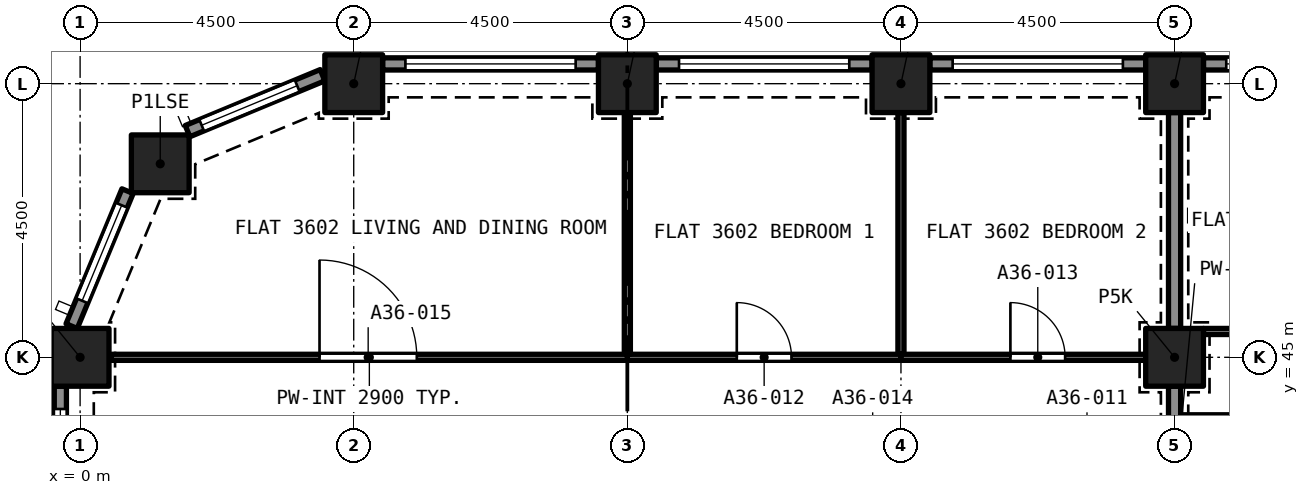
"""IFC4 building model, lengths in metres.
Left out: names, types, materials, properties, quantities, classifications, styles, units other than length and angle.
Written with IfcOpenShell. Run it as: python <this file> out.ifc"""

import sys

from ifc_helpers import new_model, si_unit, direction, frame, frame_2d, origin, origin_2d, place, context, subcontext, project, spatial, rectangle, extrude, element, fill, save


model = new_model("IFC4")
c1 = context("Model", 3, precision=1e-05, world=origin(), true_north=direction((0.0, 1.0)))
c2 = subcontext(c1, "Body", "Model", "MODEL_VIEW")
j1 = project(units=[si_unit("LENGTHUNIT", "METRE"), si_unit("PLANEANGLEUNIT", "RADIAN")], contexts=[c1])
p1 = place(None, origin())
s1 = spatial("IfcSite", under=j1, at=p1, CompositionType="ELEMENT")
p2 = place(p1, origin())
s2 = spatial("IfcBuilding", under=s1, at=p2, CompositionType="ELEMENT")
p3 = place(p2, frame((0.0, 0.0, 130.2)))
s3 = spatial("IfcBuildingStorey", under=s2, at=p3, CompositionType="ELEMENT", Elevation=130.2)
for number, where, z_axis, x_axis in (
    (1, (0.0, 45.0, 0.0), (0.0, 0.0, 1.0), (1.0, 0.0, 0.0)),
    (2, (18.0, 45.0, 0.0), (0.0, 0.0, 1.0), (1.0, 0.0, 0.0)),
    (3, (1.318, 48.182, 0.0), (0.0, 0.0, 1.0), (1.0, 0.0, 0.0)),
    (4, (4.5, 49.5, 0.0), (0.0, 0.0, 1.0), (1.0, 0.0, 0.0)),
    (5, (9.0, 49.5, 0.0), (0.0, 0.0, 1.0), (1.0, 0.0, 0.0)),
    (6, (13.5, 49.5, 0.0), (0.0, 0.0, 1.0), (1.0, 0.0, 0.0)),
    (7, (18.0, 49.5, 0.0), (0.0, 0.0, 1.0), (1.0, 0.0, 0.0)),
):
    element("IfcColumn", number, at=place(p3, frame(where, z_axis=z_axis, x_axis=x_axis)), inside=s3, PredefinedType="COLUMN", context=c2, shape_type="SweptSolid", body=[
        extrude(rectangle(XDim=0.95, YDim=0.95, at=origin_2d()), origin(), (0.0, 0.0, 1.0), 3.2),
    ])
p4 = place(p3, frame((18.475, 49.825, 0.0), z_axis=(0.0, 0.0, 1.0), x_axis=(1.0, 0.0, 0.0)))
e8 = element("IfcWall", 8, at=p4, inside=s3, PredefinedType="SOLIDWALL", context=c2, shape_type="SweptSolid", body=[
    extrude(rectangle(XDim=3.55, YDim=0.2, at=frame_2d((1.775, 0.0))), origin(), (0.0, 0.0, 1.0), 3.2),
])
p5 = place(p4, frame((0.375, 0.0, 0.45)))
e9 = element("IfcOpeningElement", 9, at=p5, cuts=e8, PredefinedType="OPENING", context=c2, shape_type="SweptSolid", body=[
    extrude(rectangle(XDim=2.8, YDim=1.95, at=frame_2d((1.4, 0.975))), frame((0.0, 0.11, 0.0), z_axis=(0.0, -1.0, 0.0), x_axis=(1.0, 0.0, 0.0)), (0.0, 0.0, 1.0), 0.22),
])
p6 = place(p3, frame((13.975, 49.825, 0.0), z_axis=(0.0, 0.0, 1.0), x_axis=(1.0, 0.0, 0.0)))
e10 = element("IfcWall", 10, at=p6, inside=s3, PredefinedType="SOLIDWALL", context=c2, shape_type="SweptSolid", body=[
    extrude(rectangle(XDim=3.55, YDim=0.2, at=frame_2d((1.775, 0.0))), origin(), (0.0, 0.0, 1.0), 3.2),
])
p7 = place(p6, frame((0.375, 0.0, 0.45)))
e11 = element("IfcOpeningElement", 11, at=p7, cuts=e10, PredefinedType="OPENING", context=c2, shape_type="SweptSolid", body=[
    extrude(rectangle(XDim=2.8, YDim=1.95, at=frame_2d((1.4, 0.975))), frame((0.0, 0.11, 0.0), z_axis=(0.0, -1.0, 0.0), x_axis=(1.0, 0.0, 0.0)), (0.0, 0.0, 1.0), 0.22),
])
p8 = place(p3, frame((9.475, 49.825, 0.0), z_axis=(0.0, 0.0, 1.0), x_axis=(1.0, 0.0, 0.0)))
e12 = element("IfcWall", 12, at=p8, inside=s3, PredefinedType="SOLIDWALL", context=c2, shape_type="SweptSolid", body=[
    extrude(rectangle(XDim=3.55, YDim=0.2, at=frame_2d((1.775, 0.0))), origin(), (0.0, 0.0, 1.0), 3.2),
])
p9 = place(p8, frame((0.375, 0.0, 0.45)))
e13 = element("IfcOpeningElement", 13, at=p9, cuts=e12, PredefinedType="OPENING", context=c2, shape_type="SweptSolid", body=[
    extrude(rectangle(XDim=2.8, YDim=1.95, at=frame_2d((1.4, 0.975))), frame((0.0, 0.11, 0.0), z_axis=(0.0, -1.0, 0.0), x_axis=(1.0, 0.0, 0.0)), (0.0, 0.0, 1.0), 0.22),
])
p10 = place(p3, frame((4.975, 49.825, 0.0), z_axis=(0.0, 0.0, 1.0), x_axis=(1.0, 0.0, 0.0)))
e14 = element("IfcWall", 14, at=p10, inside=s3, PredefinedType="SOLIDWALL", context=c2, shape_type="SweptSolid", body=[
    extrude(rectangle(XDim=3.55, YDim=0.2, at=frame_2d((1.775, 0.0))), origin(), (0.0, 0.0, 1.0), 3.2),
])
p11 = place(p10, frame((0.375, 0.0, 0.45)))
e15 = element("IfcOpeningElement", 15, at=p11, cuts=e14, PredefinedType="OPENING", context=c2, shape_type="SweptSolid", body=[
    extrude(rectangle(XDim=2.8, YDim=1.95, at=frame_2d((1.4, 0.975))), frame((0.0, 0.11, 0.0), z_axis=(0.0, -1.0, 0.0), x_axis=(1.0, 0.0, 0.0)), (0.0, 0.0, 1.0), 0.22),
])
p12 = place(p3, frame((1.767, 48.72, 0.0), z_axis=(0.0, 0.0, 1.0), x_axis=(0.923880599843, 0.382680855588, 0.0)))
e16 = element("IfcWall", 16, at=p12, inside=s3, PredefinedType="SOLIDWALL", context=c2, shape_type="SweptSolid", body=[
    extrude(rectangle(XDim=2.403, YDim=0.2, at=frame_2d((1.201, 0.0))), origin(), (0.0, 0.0, 1.0), 3.2),
])
p13 = place(p12, frame((0.251, 0.0, 0.45)))
e17 = element("IfcOpeningElement", 17, at=p13, cuts=e16, PredefinedType="OPENING", context=c2, shape_type="SweptSolid", body=[
    extrude(rectangle(XDim=1.7, YDim=1.95, at=frame_2d((0.85, 0.975))), frame((0.0, 0.11, 0.0), z_axis=(0.0, -1.0, 0.0), x_axis=(1.0, 0.0, 0.0)), (0.0, 0.0, 1.0), 0.22),
])
p14 = place(p3, frame((-0.139, 45.513, 0.0), z_axis=(0.0, 0.0, 1.0), x_axis=(0.382680855588, 0.923880599843, 0.0)))
e18 = element("IfcWall", 18, at=p14, inside=s3, PredefinedType="SOLIDWALL", context=c2, shape_type="SweptSolid", body=[
    extrude(rectangle(XDim=2.403, YDim=0.2, at=frame_2d((1.201, 0.0))), origin(), (0.0, 0.0, 1.0), 3.2),
])
p15 = place(p14, frame((0.451, 0.0, 0.45)))
e19 = element("IfcOpeningElement", 19, at=p15, cuts=e18, PredefinedType="OPENING", context=c2, shape_type="SweptSolid", body=[
    extrude(rectangle(XDim=1.7, YDim=1.95, at=frame_2d((0.85, 0.975))), frame((0.0, 0.11, 0.0), z_axis=(0.0, -1.0, 0.0), x_axis=(1.0, 0.0, 0.0)), (0.0, 0.0, 1.0), 0.22),
])
p16 = place(p3, frame((-0.325, 40.975, 0.0), z_axis=(0.0, 0.0, 1.0), x_axis=(0.0, 1.0, 0.0)))
e20 = element("IfcWall", 20, at=p16, inside=s3, PredefinedType="SOLIDWALL", context=c2, shape_type="SweptSolid", body=[
    extrude(rectangle(XDim=3.55, YDim=0.2, at=frame_2d((1.775, 0.0))), origin(), (0.0, 0.0, 1.0), 3.2),
])
p17 = place(p16, frame((0.375, 0.0, 0.45)))
e21 = element("IfcOpeningElement", 21, at=p17, cuts=e20, PredefinedType="OPENING", context=c2, shape_type="SweptSolid", body=[
    extrude(rectangle(XDim=2.8, YDim=1.95, at=frame_2d((1.4, 0.975))), frame((0.0, 0.11, 0.0), z_axis=(0.0, -1.0, 0.0), x_axis=(1.0, 0.0, 0.0)), (0.0, 0.0, 1.0), 0.22),
])
p18 = place(p3, frame((18.0, 40.975, 0.0), z_axis=(0.0, 0.0, 1.0), x_axis=(0.0, 1.0, 0.0)))
e22 = element("IfcWall", 22, at=p18, inside=s3, PredefinedType="PARTITIONING", context=c2, shape_type="SweptSolid", body=[
    extrude(rectangle(XDim=3.55, YDim=0.2, at=frame_2d((1.775, 0.0))), origin(), (0.0, 0.0, 1.0), 2.38),
])
p19 = place(p3, frame((13.5, 45.05, 0.0), z_axis=(0.0, 0.0, 1.0), x_axis=(0.0, 1.0, 0.0)))
e23 = element("IfcWall", 23, at=p19, inside=s3, PredefinedType="PARTITIONING", context=c2, shape_type="SweptSolid", body=[
    extrude(rectangle(XDim=3.975, YDim=0.1, at=frame_2d((1.987, 0.0))), origin(), (0.0, 0.0, 1.0), 2.9),
])
p20 = place(p3, frame((9.0, 45.0, 0.0), z_axis=(0.0, 0.0, 1.0), x_axis=(1.0, 0.0, 0.0)))
e24 = element("IfcWall", 24, at=p20, inside=s3, PredefinedType="PARTITIONING", context=c2, shape_type="SweptSolid", body=[
    extrude(rectangle(XDim=4.5, YDim=0.1, at=frame_2d((2.25, 0.0))), origin(), (0.0, 0.0, 1.0), 2.9),
])
p21 = place(p20, frame((1.8, 0.0, 0.0)))
e25 = element("IfcOpeningElement", 25, at=p21, cuts=e24, PredefinedType="OPENING", context=c2, shape_type="SweptSolid", body=[
    extrude(rectangle(XDim=0.9, YDim=2.1, at=frame_2d((0.45, 1.05))), frame((0.0, 0.06, 0.0), z_axis=(0.0, -1.0, 0.0), x_axis=(1.0, 0.0, 0.0)), (0.0, 0.0, 1.0), 0.12),
])
p22 = place(p3, frame((9.0, 45.05, 0.0), z_axis=(0.0, 0.0, 1.0), x_axis=(0.0, 1.0, 0.0)))
e26 = element("IfcWall", 26, at=p22, inside=s3, PredefinedType="PARTITIONING", context=c2, shape_type="SweptSolid", body=[
    extrude(rectangle(XDim=3.975, YDim=0.1, at=frame_2d((1.987, 0.0))), origin(), (0.0, 0.0, 1.0), 2.9),
])
p23 = place(p3, frame((13.5, 45.0, 0.0), z_axis=(0.0, 0.0, 1.0), x_axis=(1.0, 0.0, 0.0)))
e27 = element("IfcWall", 27, at=p23, inside=s3, PredefinedType="PARTITIONING", context=c2, shape_type="SweptSolid", body=[
    extrude(rectangle(XDim=4.025, YDim=0.1, at=frame_2d((2.012, 0.0))), origin(), (0.0, 0.0, 1.0), 2.9),
])
p24 = place(p23, frame((1.8, 0.0, 0.0)))
e28 = element("IfcOpeningElement", 28, at=p24, cuts=e27, PredefinedType="OPENING", context=c2, shape_type="SweptSolid", body=[
    extrude(rectangle(XDim=0.9, YDim=2.1, at=frame_2d((0.45, 1.05))), frame((0.0, 0.06, 0.0), z_axis=(0.0, -1.0, 0.0), x_axis=(1.0, 0.0, 0.0)), (0.0, 0.0, 1.0), 0.12),
])
p25 = place(p3, frame((18.0, 45.475, 0.0), z_axis=(0.0, 0.0, 1.0), x_axis=(0.0, 1.0, 0.0)))
e29 = element("IfcWall", 29, at=p25, inside=s3, PredefinedType="PARTITIONING", context=c2, shape_type="SweptSolid", body=[
    extrude(rectangle(XDim=3.55, YDim=0.2, at=frame_2d((1.775, 0.0))), origin(), (0.0, 0.0, 1.0), 2.38),
])
p26 = place(p3, frame((0.514, 45.0, 0.0), z_axis=(0.0, 0.0, 1.0), x_axis=(1.0, 0.0, 0.0)))
e30 = element("IfcWall", 30, at=p26, inside=s3, PredefinedType="PARTITIONING", context=c2, shape_type="SweptSolid", body=[
    extrude(rectangle(XDim=8.486, YDim=0.1, at=frame_2d((4.243, 0.0))), origin(), (0.0, 0.0, 1.0), 2.9),
])
p27 = place(p26, frame((3.423, 0.0, 0.0)))
e31 = element("IfcOpeningElement", 31, at=p27, cuts=e30, PredefinedType="OPENING", context=c2, shape_type="SweptSolid", body=[
    extrude(rectangle(XDim=1.6, YDim=2.1, at=frame_2d((0.8, 1.05))), frame((0.0, 0.06, 0.0), z_axis=(0.0, -1.0, 0.0), x_axis=(1.0, 0.0, 0.0)), (0.0, 0.0, 1.0), 0.12),
])
p28 = place(p3, frame((21.24, 44.005, 0.0), z_axis=(0.0, 0.0, 1.0), x_axis=(-1.0, 0.0, 0.0)))
e32 = element("IfcWall", 32, at=p28, inside=s3, PredefinedType="PARTITIONING", context=c2, shape_type="SweptSolid", body=[
    extrude(rectangle(XDim=3.14, YDim=0.1, at=frame_2d((1.57, 0.0))), origin(), (0.0, 0.0, 1.0), 2.75),
])
p29 = place(p28, frame((1.17, 0.0, 0.0)))
e33 = element("IfcOpeningElement", 33, at=p29, cuts=e32, PredefinedType="OPENING", context=c2, shape_type="SweptSolid", body=[
    extrude(rectangle(XDim=0.9, YDim=2.1, at=frame_2d((0.45, 1.05))), frame((0.0, 0.06, 0.0), z_axis=(0.0, -1.0, 0.0), x_axis=(1.0, 0.0, 0.0)), (0.0, 0.0, 1.0), 0.12),
])
p30 = place(p3, frame((18.475, 45.425, 0.0), z_axis=(0.0, 0.0, 1.0), x_axis=(1.0, 0.0, 0.0)))
e34 = element("IfcWall", 34, at=p30, inside=s3, PredefinedType="PARTITIONING", context=c2, shape_type="SweptSolid", body=[
    extrude(rectangle(XDim=4.025, YDim=0.1, at=frame_2d((2.012, 0.0))), origin(), (0.0, 0.0, 1.0), 2.75),
])
p31 = place(p30, frame((1.275, 0.0, 0.0)))
e35 = element("IfcOpeningElement", 35, at=p31, cuts=e34, PredefinedType="OPENING", context=c2, shape_type="SweptSolid", body=[
    extrude(rectangle(XDim=1.0, YDim=2.1, at=frame_2d((0.5, 1.05))), frame((0.0, 0.06, 0.0), z_axis=(0.0, -1.0, 0.0), x_axis=(1.0, 0.0, 0.0)), (0.0, 0.0, 1.0), 0.12),
])
p32 = place(p5, origin())
e36 = element("IfcWindow", 36, at=p32, inside=s3, PartitioningType="SINGLE_PANEL", PredefinedType="WINDOW", context=c2, shape_type="SweptSolid", body=[
    extrude(rectangle(XDim=2.8, YDim=1.95, at=frame_2d((1.4, 0.975))), frame((0.0, 0.03, 0.0), z_axis=(0.0, -1.0, 0.0), x_axis=(1.0, 0.0, 0.0)), (0.0, 0.0, 1.0), 0.06),
])
fill(e9, e36)
p33 = place(p7, origin())
e37 = element("IfcWindow", 37, at=p33, inside=s3, PartitioningType="SINGLE_PANEL", PredefinedType="WINDOW", context=c2, shape_type="SweptSolid", body=[
    extrude(rectangle(XDim=2.8, YDim=1.95, at=frame_2d((1.4, 0.975))), frame((0.0, 0.03, 0.0), z_axis=(0.0, -1.0, 0.0), x_axis=(1.0, 0.0, 0.0)), (0.0, 0.0, 1.0), 0.06),
])
fill(e11, e37)
p34 = place(p9, origin())
e38 = element("IfcWindow", 38, at=p34, inside=s3, PartitioningType="SINGLE_PANEL", PredefinedType="WINDOW", context=c2, shape_type="SweptSolid", body=[
    extrude(rectangle(XDim=2.8, YDim=1.95, at=frame_2d((1.4, 0.975))), frame((0.0, 0.03, 0.0), z_axis=(0.0, -1.0, 0.0), x_axis=(1.0, 0.0, 0.0)), (0.0, 0.0, 1.0), 0.06),
])
fill(e13, e38)
p35 = place(p11, origin())
e39 = element("IfcWindow", 39, at=p35, inside=s3, PartitioningType="SINGLE_PANEL", PredefinedType="WINDOW", context=c2, shape_type="SweptSolid", body=[
    extrude(rectangle(XDim=2.8, YDim=1.95, at=frame_2d((1.4, 0.975))), frame((0.0, 0.03, 0.0), z_axis=(0.0, -1.0, 0.0), x_axis=(1.0, 0.0, 0.0)), (0.0, 0.0, 1.0), 0.06),
])
fill(e15, e39)
p36 = place(p13, origin())
e40 = element("IfcWindow", 40, at=p36, inside=s3, PartitioningType="SINGLE_PANEL", PredefinedType="WINDOW", context=c2, shape_type="SweptSolid", body=[
    extrude(rectangle(XDim=1.7, YDim=1.95, at=frame_2d((0.85, 0.975))), frame((0.0, 0.03, 0.0), z_axis=(0.0, -1.0, 0.0), x_axis=(1.0, 0.0, 0.0)), (0.0, 0.0, 1.0), 0.06),
])
fill(e17, e40)
p37 = place(p15, origin())
e41 = element("IfcWindow", 41, at=p37, inside=s3, PartitioningType="SINGLE_PANEL", PredefinedType="WINDOW", context=c2, shape_type="SweptSolid", body=[
    extrude(rectangle(XDim=1.7, YDim=1.95, at=frame_2d((0.85, 0.975))), frame((0.0, 0.03, 0.0), z_axis=(0.0, -1.0, 0.0), x_axis=(1.0, 0.0, 0.0)), (0.0, 0.0, 1.0), 0.06),
])
fill(e19, e41)
p38 = place(p17, origin())
e42 = element("IfcWindow", 42, at=p38, inside=s3, PartitioningType="SINGLE_PANEL", PredefinedType="WINDOW", context=c2, shape_type="SweptSolid", body=[
    extrude(rectangle(XDim=2.8, YDim=1.95, at=frame_2d((1.4, 0.975))), frame((0.0, 0.03, 0.0), z_axis=(0.0, -1.0, 0.0), x_axis=(1.0, 0.0, 0.0)), (0.0, 0.0, 1.0), 0.06),
])
fill(e21, e42)
p39 = place(p21, origin())
e43 = element("IfcDoor", 43, at=p39, inside=s3, OperationType="SINGLE_SWING_LEFT", PredefinedType="DOOR", context=c2, shape_type="SweptSolid", body=[
    extrude(rectangle(XDim=0.9, YDim=2.1, at=frame_2d((0.45, 1.05))), frame((0.0, 0.025, 0.0), z_axis=(0.0, -1.0, 0.0), x_axis=(1.0, 0.0, 0.0)), (0.0, 0.0, 1.0), 0.05),
])
fill(e25, e43)
p40 = place(p24, origin())
e44 = element("IfcDoor", 44, at=p40, inside=s3, OperationType="SINGLE_SWING_RIGHT", PredefinedType="DOOR", context=c2, shape_type="SweptSolid", body=[
    extrude(rectangle(XDim=0.9, YDim=2.1, at=frame_2d((0.45, 1.05))), frame((0.0, 0.025, 0.0), z_axis=(0.0, -1.0, 0.0), x_axis=(1.0, 0.0, 0.0)), (0.0, 0.0, 1.0), 0.05),
])
fill(e28, e44)
p41 = place(p27, origin())
e45 = element("IfcDoor", 45, at=p41, inside=s3, OperationType="SINGLE_SWING_LEFT", PredefinedType="DOOR", context=c2, shape_type="SweptSolid", body=[
    extrude(rectangle(XDim=1.6, YDim=2.1, at=frame_2d((0.8, 1.05))), frame((0.0, 0.025, 0.0), z_axis=(0.0, -1.0, 0.0), x_axis=(1.0, 0.0, 0.0)), (0.0, 0.0, 1.0), 0.05),
])
fill(e31, e45)
save(model, sys.argv[1])
